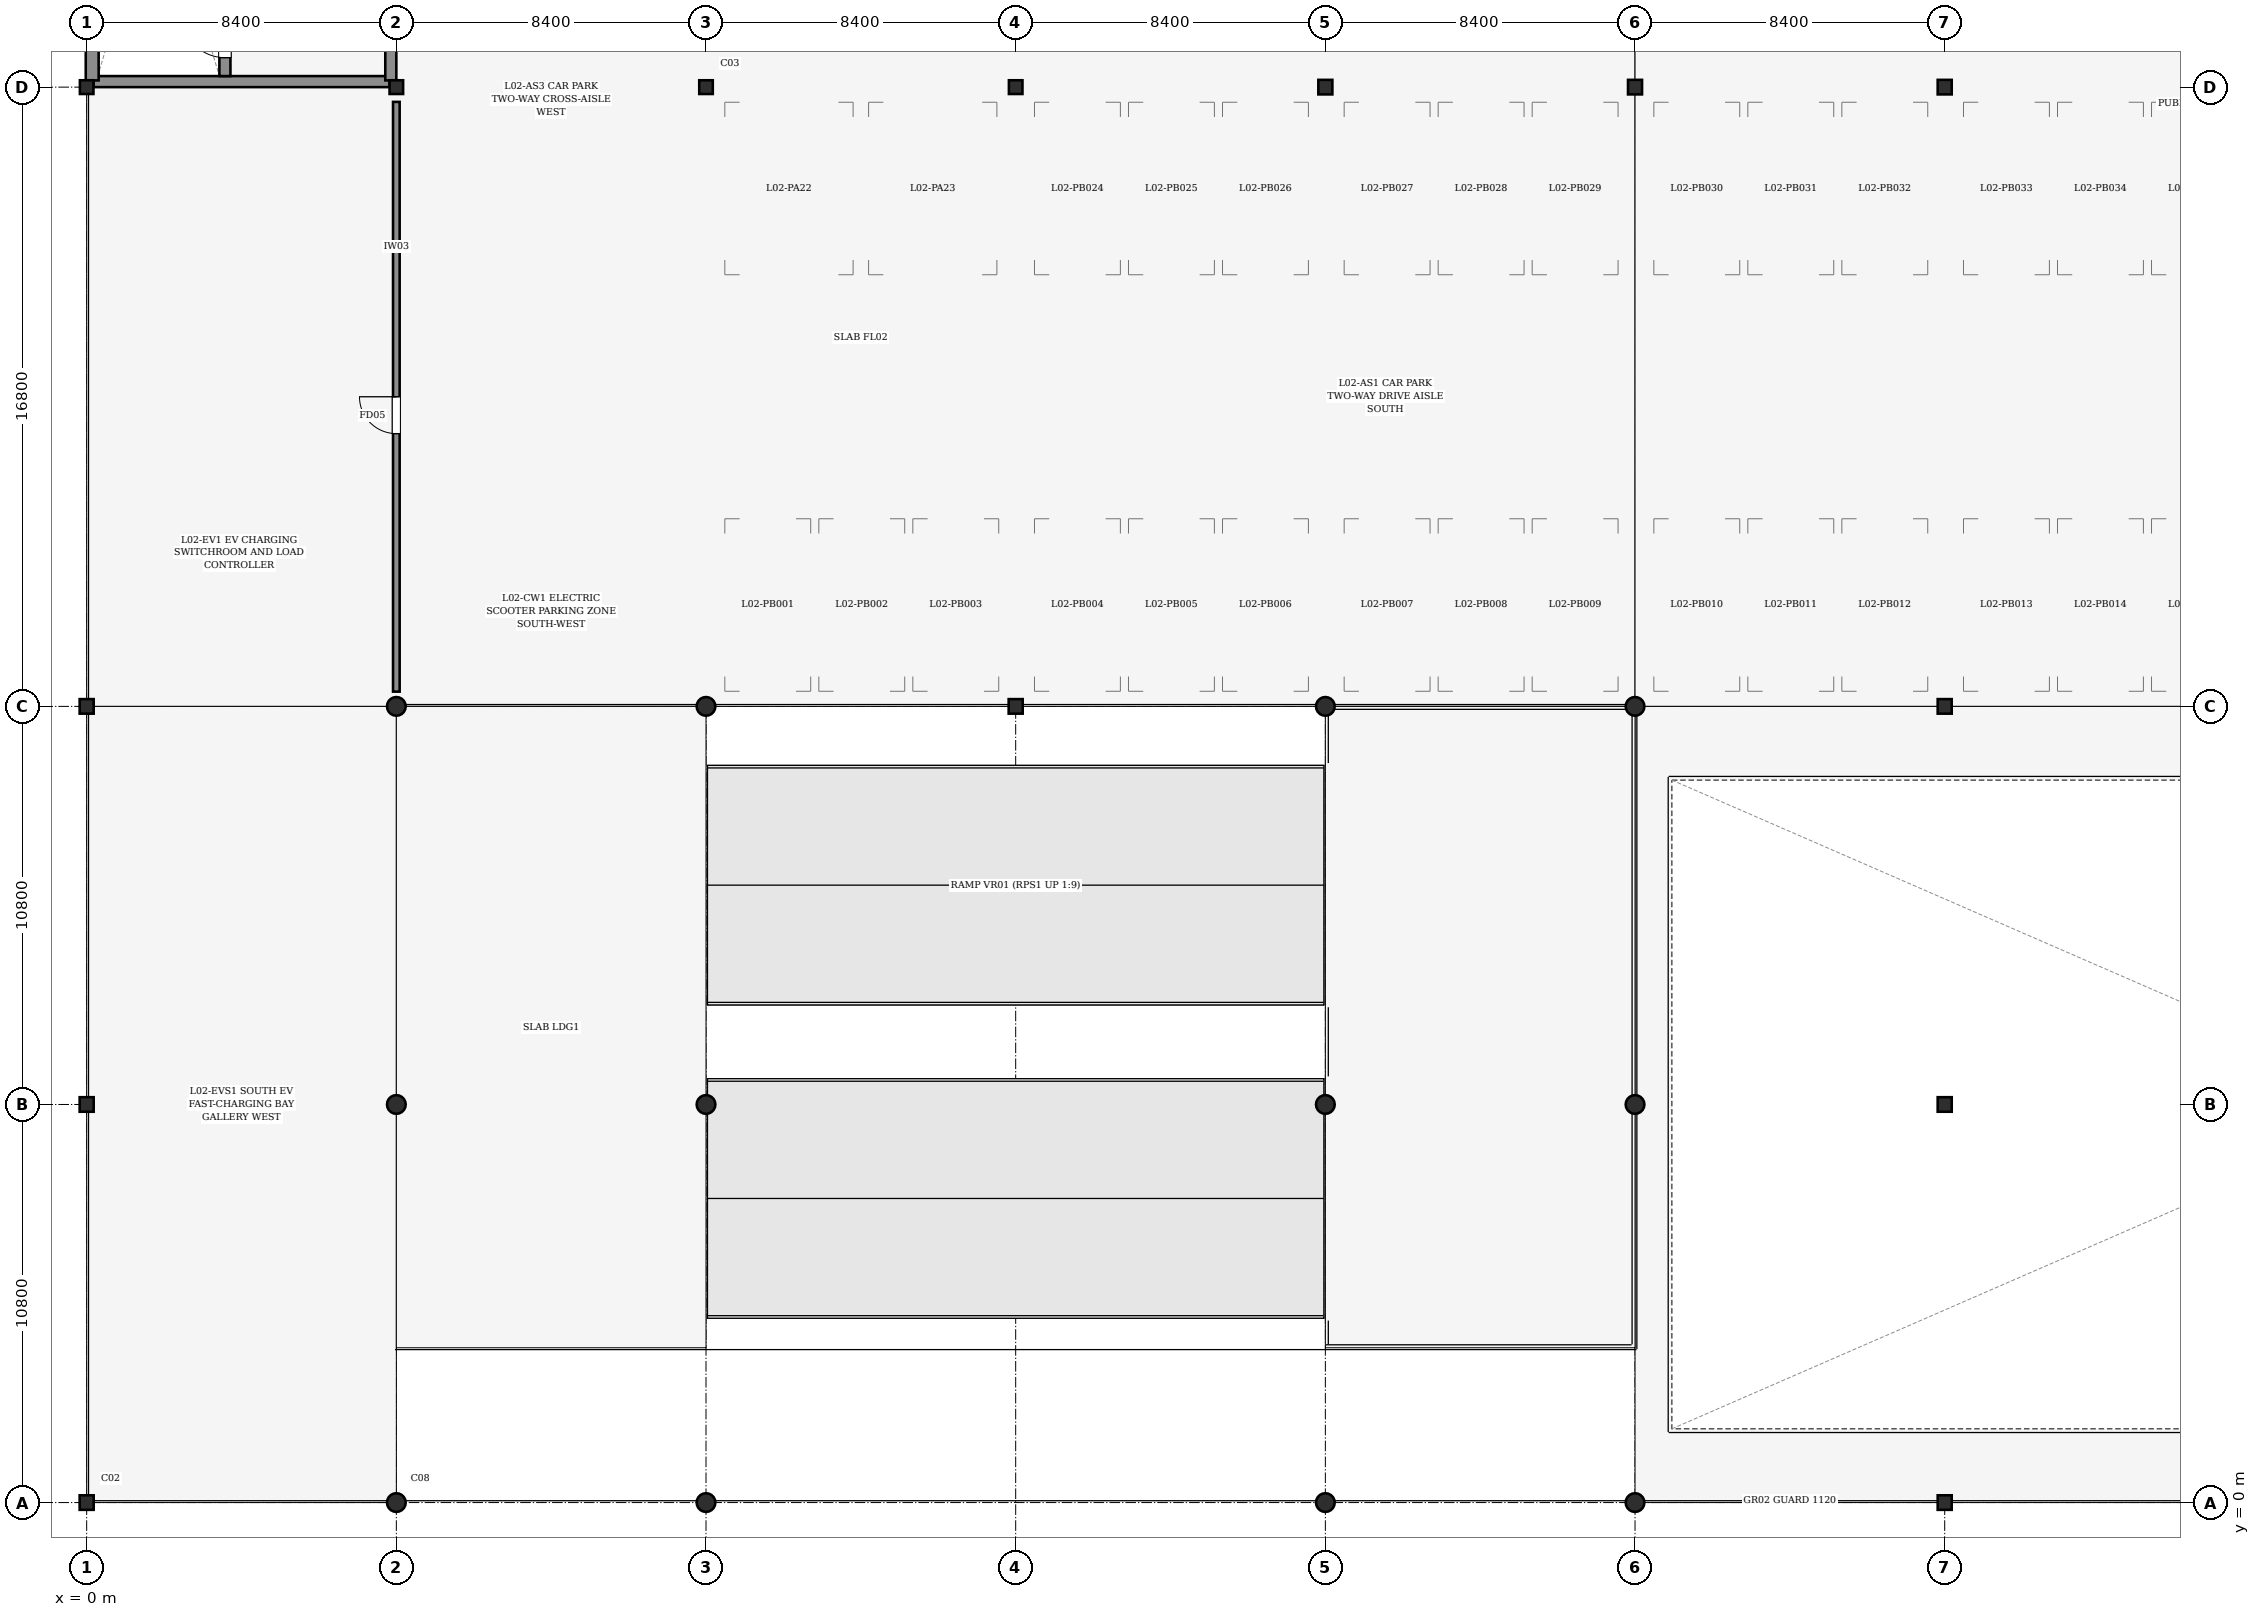
"""IFC4 building model, lengths in metres.
Left out: names, types, materials, properties, quantities, classifications, styles, units other than length and angle.
Written with IfcOpenShell. Run it as: python <this file> out.ifc"""

import sys

from ifc_helpers import new_model, si_unit, direction, frame, frame_2d, origin, origin_2d, place, context, subcontext, project, spatial, rectangle, hollow_circle, i_section, extrude, element, fill, save


model = new_model("IFC4")
c1 = context("Model", 3, precision=1e-05, world=origin(), true_north=direction((0.0, 1.0)))
c2 = subcontext(c1, "Body", "Model", "MODEL_VIEW")
j1 = project(units=[si_unit("LENGTHUNIT", "METRE"), si_unit("PLANEANGLEUNIT", "RADIAN")], contexts=[c1])
p1 = place(None, origin())
s1 = spatial("IfcSite", under=j1, at=p1, CompositionType="ELEMENT")
p2 = place(p1, origin())
s2 = spatial("IfcBuilding", under=s1, at=p2, CompositionType="ELEMENT")
p3 = place(p2, frame((0.0, 0.0, 9.0)))
s3 = spatial("IfcBuildingStorey", under=s2, at=p3, CompositionType="ELEMENT", Elevation=9.0)
for number, where, z_axis, x_axis in (
    (1, (0.0, 0.0, 0.0), (0.0, 0.0, 1.0), (1.0, 0.0, 0.0)),
    (2, (0.0, 10.8, 0.0), (0.0, 0.0, 1.0), (1.0, 0.0, 0.0)),
    (3, (0.0, 21.6, 0.0), (0.0, 0.0, 1.0), (1.0, 0.0, 0.0)),
):
    element("IfcColumn", number, at=place(p3, frame(where, z_axis=z_axis, x_axis=x_axis)), inside=s3, PredefinedType="COLUMN", context=c2, shape_type="SweptSolid", body=[
        extrude(i_section(OverallWidth=0.395, OverallDepth=0.381, WebThickness=0.018, FlangeThickness=0.03, FilletRadius=0.015, at=origin_2d()), origin(), (0.0, 0.0, 1.0), 3.6),
    ])
p4 = place(p3, frame((0.0, 38.4, 0.0), z_axis=(0.0, 0.0, 1.0), x_axis=(1.0, 0.0, 0.0)))
e4 = element("IfcColumn", 4, at=p4, inside=s3, PredefinedType="COLUMN", context=c2, shape_type="SweptSolid", body=[
    extrude(i_section(OverallWidth=0.373, OverallDepth=0.368, WebThickness=0.014, FlangeThickness=0.024, FilletRadius=0.015, at=origin_2d()), origin(), (0.0, 0.0, 1.0), 3.6),
])
for number, where, z_axis, x_axis in (
    (5, (8.4, 0.0, 0.0), (0.0, 0.0, 1.0), (1.0, 0.0, 0.0)),
    (6, (8.4, 10.8, 0.0), (0.0, 0.0, 1.0), (1.0, 0.0, 0.0)),
    (7, (8.4, 21.6, 0.0), (0.0, 0.0, 1.0), (1.0, 0.0, 0.0)),
):
    element("IfcColumn", number, at=place(p3, frame(where, z_axis=z_axis, x_axis=x_axis)), inside=s3, PredefinedType="COLUMN", context=c2, shape_type="SweptSolid", body=[
        extrude(hollow_circle(Radius=0.254, WallThickness=0.016, at=origin_2d()), origin(), (0.0, 0.0, 1.0), 3.6),
    ])
p5 = place(p3, frame((8.4, 38.4, 0.0), z_axis=(0.0, 0.0, 1.0), x_axis=(1.0, 0.0, 0.0)))
e8 = element("IfcColumn", 8, at=p5, inside=s3, PredefinedType="COLUMN", context=c2, shape_type="SweptSolid", body=[
    extrude(i_section(OverallWidth=0.373, OverallDepth=0.368, WebThickness=0.014, FlangeThickness=0.024, FilletRadius=0.015, at=origin_2d()), origin(), (0.0, 0.0, 1.0), 3.6),
])
for number, where, z_axis, x_axis in (
    (9, (16.8, 0.0, 0.0), (0.0, 0.0, 1.0), (1.0, 0.0, 0.0)),
    (10, (16.8, 10.8, 0.0), (0.0, 0.0, 1.0), (1.0, 0.0, 0.0)),
    (11, (16.8, 21.6, 0.0), (0.0, 0.0, 1.0), (1.0, 0.0, 0.0)),
):
    element("IfcColumn", number, at=place(p3, frame(where, z_axis=z_axis, x_axis=x_axis)), inside=s3, PredefinedType="COLUMN", context=c2, shape_type="SweptSolid", body=[
        extrude(hollow_circle(Radius=0.254, WallThickness=0.016, at=origin_2d()), origin(), (0.0, 0.0, 1.0), 3.6),
    ])
p6 = place(p3, frame((16.8, 38.4, 0.0), z_axis=(0.0, 0.0, 1.0), x_axis=(1.0, 0.0, 0.0)))
e12 = element("IfcColumn", 12, at=p6, inside=s3, PredefinedType="COLUMN", context=c2, shape_type="SweptSolid", body=[
    extrude(i_section(OverallWidth=0.373, OverallDepth=0.368, WebThickness=0.014, FlangeThickness=0.024, FilletRadius=0.015, at=origin_2d()), origin(), (0.0, 0.0, 1.0), 3.6),
])
p7 = place(p3, frame((25.2, 21.6, 0.0), z_axis=(0.0, 0.0, 1.0), x_axis=(1.0, 0.0, 0.0)))
e13 = element("IfcColumn", 13, at=p7, inside=s3, PredefinedType="COLUMN", context=c2, shape_type="SweptSolid", body=[
    extrude(i_section(OverallWidth=0.395, OverallDepth=0.381, WebThickness=0.018, FlangeThickness=0.03, FilletRadius=0.015, at=origin_2d()), origin(), (0.0, 0.0, 1.0), 3.6),
])
p8 = place(p3, frame((25.2, 38.4, 0.0), z_axis=(0.0, 0.0, 1.0), x_axis=(1.0, 0.0, 0.0)))
e14 = element("IfcColumn", 14, at=p8, inside=s3, PredefinedType="COLUMN", context=c2, shape_type="SweptSolid", body=[
    extrude(i_section(OverallWidth=0.373, OverallDepth=0.368, WebThickness=0.014, FlangeThickness=0.024, FilletRadius=0.015, at=origin_2d()), origin(), (0.0, 0.0, 1.0), 3.6),
])
for number, where, z_axis, x_axis in (
    (15, (33.6, 0.0, 0.0), (0.0, 0.0, 1.0), (1.0, 0.0, 0.0)),
    (16, (33.6, 10.8, 0.0), (0.0, 0.0, 1.0), (1.0, 0.0, 0.0)),
    (17, (33.6, 21.6, 0.0), (0.0, 0.0, 1.0), (1.0, 0.0, 0.0)),
):
    element("IfcColumn", number, at=place(p3, frame(where, z_axis=z_axis, x_axis=x_axis)), inside=s3, PredefinedType="COLUMN", context=c2, shape_type="SweptSolid", body=[
        extrude(hollow_circle(Radius=0.254, WallThickness=0.016, at=origin_2d()), origin(), (0.0, 0.0, 1.0), 3.6),
    ])
p9 = place(p3, frame((33.6, 38.4, 0.0), z_axis=(0.0, 0.0, 1.0), x_axis=(1.0, 0.0, 0.0)))
e18 = element("IfcColumn", 18, at=p9, inside=s3, PredefinedType="COLUMN", context=c2, shape_type="SweptSolid", body=[
    extrude(i_section(OverallWidth=0.395, OverallDepth=0.381, WebThickness=0.018, FlangeThickness=0.03, FilletRadius=0.015, at=origin_2d()), origin(), (0.0, 0.0, 1.0), 3.6),
])
for number, where, z_axis, x_axis in (
    (19, (42.0, 0.0, 0.0), (0.0, 0.0, 1.0), (1.0, 0.0, 0.0)),
    (20, (42.0, 10.8, 0.0), (0.0, 0.0, 1.0), (1.0, 0.0, 0.0)),
    (21, (42.0, 21.6, 0.0), (0.0, 0.0, 1.0), (1.0, 0.0, 0.0)),
):
    element("IfcColumn", number, at=place(p3, frame(where, z_axis=z_axis, x_axis=x_axis)), inside=s3, PredefinedType="COLUMN", context=c2, shape_type="SweptSolid", body=[
        extrude(hollow_circle(Radius=0.254, WallThickness=0.016, at=origin_2d()), origin(), (0.0, 0.0, 1.0), 3.6),
    ])
for number, where, z_axis, x_axis in (
    (22, (42.0, 38.4, 0.0), (0.0, 0.0, 1.0), (1.0, 0.0, 0.0)),
    (23, (50.4, 0.0, 0.0), (0.0, 0.0, 1.0), (1.0, 0.0, 0.0)),
    (24, (50.4, 10.8, 0.0), (0.0, 0.0, 1.0), (1.0, 0.0, 0.0)),
    (25, (50.4, 21.6, 0.0), (0.0, 0.0, 1.0), (1.0, 0.0, 0.0)),
    (26, (50.4, 38.4, 0.0), (0.0, 0.0, 1.0), (1.0, 0.0, 0.0)),
):
    element("IfcColumn", number, at=place(p3, frame(where, z_axis=z_axis, x_axis=x_axis)), inside=s3, PredefinedType="COLUMN", context=c2, shape_type="SweptSolid", body=[
        extrude(i_section(OverallWidth=0.395, OverallDepth=0.381, WebThickness=0.018, FlangeThickness=0.03, FilletRadius=0.015, at=origin_2d()), origin(), (0.0, 0.0, 1.0), 3.6),
    ])
p10 = place(p3, frame((0.185, 38.55, 0.0), z_axis=(0.0, 0.0, 1.0), x_axis=(1.0, 0.0, 0.0)))
e27 = element("IfcWall", 27, at=p10, inside=s3, PredefinedType="SHEAR", context=c2, shape_type="SweptSolid", body=[
    extrude(rectangle(XDim=8.031, YDim=0.3, at=frame_2d((4.016, 0.0))), origin(), (0.0, 0.0, 1.0), 3.38),
])
p11 = place(p3, frame((0.15, 38.582, 0.0), z_axis=(0.0, 0.0, 1.0), x_axis=(0.0, 1.0, 0.0)))
e28 = element("IfcWall", 28, at=p11, inside=s3, PredefinedType="SHEAR", context=c2, shape_type="SweptSolid", body=[
    extrude(rectangle(XDim=16.436, YDim=0.35, at=frame_2d((8.218, 0.0))), origin(), (0.0, 0.0, 1.0), 3.38),
])
p12 = place(p3, frame((8.25, 38.582, 0.0), z_axis=(0.0, 0.0, 1.0), x_axis=(0.0, 1.0, 0.0)))
e29 = element("IfcWall", 29, at=p12, inside=s3, PredefinedType="SHEAR", context=c2, shape_type="SweptSolid", body=[
    extrude(rectangle(XDim=16.436, YDim=0.3, at=frame_2d((8.218, 0.0))), origin(), (0.0, 0.0, 1.0), 3.38),
])
p13 = place(p12, frame((5.668, 0.0, 0.0)))
e30 = element("IfcOpeningElement", 30, at=p13, cuts=e29, PredefinedType="OPENING", context=c2, shape_type="SweptSolid", body=[
    extrude(rectangle(XDim=1.3, YDim=2.2, at=frame_2d((0.65, 1.1))), frame((0.0, 0.16, 0.0), z_axis=(0.0, -1.0, 0.0), x_axis=(1.0, 0.0, 0.0)), (0.0, 0.0, 1.0), 0.32),
])
p14 = place(p3, frame((3.75, 38.7, 0.0), z_axis=(0.0, 0.0, 1.0), x_axis=(0.0, 1.0, 0.0)))
e31 = element("IfcWall", 31, at=p14, inside=s3, PredefinedType="SHEAR", context=c2, shape_type="SweptSolid", body=[
    extrude(rectangle(XDim=16.2, YDim=0.3, at=frame_2d((8.1, 0.0))), origin(), (0.0, 0.0, 1.0), 3.38),
])
p15 = place(p14, frame((0.5, 0.0, 0.0)))
e32 = element("IfcOpeningElement", 32, at=p15, cuts=e31, PredefinedType="OPENING", context=c2, shape_type="SweptSolid", body=[
    extrude(rectangle(XDim=1.15, YDim=2.15, at=frame_2d((0.575, 1.075))), frame((0.0, 0.16, 0.0), z_axis=(0.0, -1.0, 0.0), x_axis=(1.0, 0.0, 0.0)), (0.0, 0.0, 1.0), 0.32),
])
p16 = place(p3, frame((8.4, 22.0, 0.0), z_axis=(0.0, 0.0, 1.0), x_axis=(0.0, 1.0, 0.0)))
e33 = element("IfcWall", 33, at=p16, inside=s3, PredefinedType="PARTITIONING", context=c2, shape_type="SweptSolid", body=[
    extrude(rectangle(XDim=16.0, YDim=0.18, at=frame_2d((8.0, 0.0))), origin(), (0.0, 0.0, 1.0), 2.525),
])
p17 = place(p16, frame((7.0, 0.0, 0.0)))
e34 = element("IfcOpeningElement", 34, at=p17, cuts=e33, PredefinedType="OPENING", context=c2, shape_type="SweptSolid", body=[
    extrude(rectangle(XDim=1.0, YDim=2.15, at=frame_2d((0.5, 1.075))), frame((0.0, 0.1, 0.0), z_axis=(0.0, -1.0, 0.0), x_axis=(1.0, 0.0, 0.0)), (0.0, 0.0, 1.0), 0.2),
])
p18 = place(p15, frame((1.15, 0.0, 0.0), z_axis=(0.0, 0.0, 1.0), x_axis=(-1.0, 0.0, 0.0)))
e35 = element("IfcDoor", 35, at=p18, inside=s3, OperationType="SINGLE_SWING_LEFT", PredefinedType="DOOR", context=c2, shape_type="SweptSolid", body=[
    extrude(rectangle(XDim=1.15, YDim=2.15, at=frame_2d((0.575, 1.075))), frame((0.0, 0.025, 0.0), z_axis=(0.0, -1.0, 0.0), x_axis=(1.0, 0.0, 0.0)), (0.0, 0.0, 1.0), 0.05),
])
fill(e32, e35)
p19 = place(p17, origin())
e36 = element("IfcDoor", 36, at=p19, inside=s3, OperationType="SINGLE_SWING_RIGHT", PredefinedType="DOOR", context=c2, shape_type="SweptSolid", body=[
    extrude(rectangle(XDim=1.0, YDim=2.15, at=frame_2d((0.5, 1.075))), frame((0.0, 0.025, 0.0), z_axis=(0.0, -1.0, 0.0), x_axis=(1.0, 0.0, 0.0)), (0.0, 0.0, 1.0), 0.05),
])
fill(e34, e36)
save(model, sys.argv[1])
